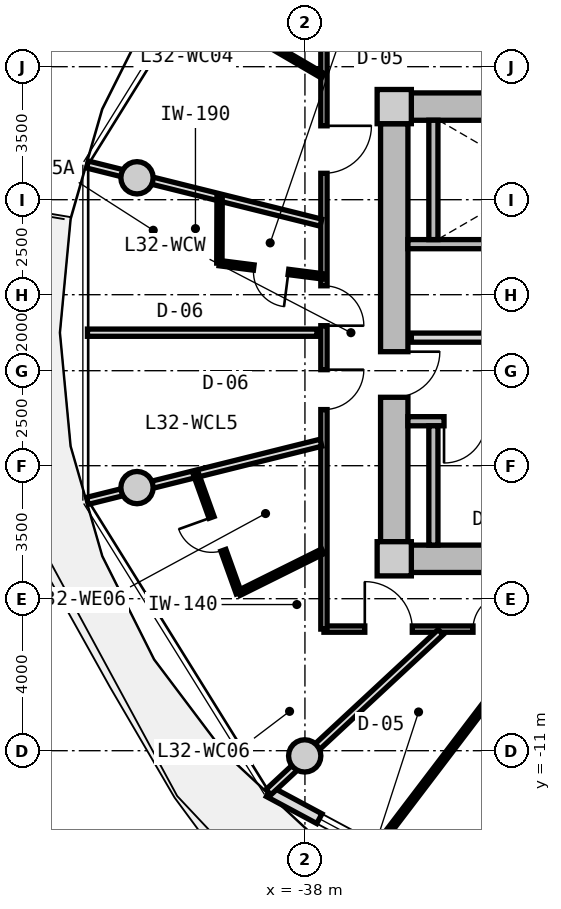
"""IFC4 building model, lengths in metres.
Left out: names, types, materials, properties, quantities, classifications, styles, units other than length and angle.
Written with IfcOpenShell. Run it as: python <this file> out.ifc"""

import sys

from ifc_helpers import new_model, si_unit, direction, frame, frame_2d, origin, origin_2d, place, context, subcontext, project, spatial, rectangle, circle, extrude, source, transform, mapped, element, fill, save


model = new_model("IFC4")
c1 = context("Model", 3, precision=1e-05, world=origin(), true_north=direction((0.0, 1.0)))
c2 = subcontext(c1, "Body", "Model", "MODEL_VIEW")
j1 = project(units=[si_unit("LENGTHUNIT", "METRE"), si_unit("PLANEANGLEUNIT", "RADIAN")], contexts=[c1])
p1 = place(None, origin())
s1 = spatial("IfcSite", under=j1, at=p1, CompositionType="ELEMENT")
p2 = place(p1, origin())
s2 = spatial("IfcBuilding", under=s1, at=p2, CompositionType="ELEMENT")
p3 = place(p2, frame((0.0, 0.0, 105.4)))
s3 = spatial("IfcBuildingStorey", under=s2, at=p3, CompositionType="ELEMENT", Elevation=105.4)
m1 = source(origin(), c2, "Body", "SweptSolid", [
    extrude(rectangle(XDim=0.9, YDim=0.9, at=origin_2d()), origin(), (0.0, 0.0, 1.0), 3.05),
])
for number, where, z_axis, x_axis in (
    (1, (-35.65, -5.95, 0.0), (0.0, 0.0, 1.0), (1.0, 0.0, 0.0)),
    (2, (-35.65, 5.95, 0.0), (0.0, 0.0, 1.0), (1.0, 0.0, 0.0)),
):
    element("IfcColumn", number, at=place(p3, frame(where, z_axis=z_axis, x_axis=x_axis)), inside=s3, PredefinedType="COLUMN", context=c2, shape_type="MappedRepresentation", body=[
        mapped(m1, transform((0.0, 0.0, 0.0), x_axis=(1.0, 0.0, 0.0), y_axis=(0.0, 1.0, 0.0), z_axis=(0.0, 0.0, 1.0), scale=1.0)),
    ])
m2 = source(origin(), c2, "Body", "SweptSolid", [
    extrude(rectangle(XDim=14.4, YDim=0.72, at=frame_2d((7.2, 0.0))), origin(), (0.0, 0.0, 1.0), 2.79),
])
for number, where, z_axis, x_axis in (
    (3, (-35.2, 5.95, 0.0), (0.0, 0.0, 1.0), (1.0, 0.0, 0.0)),
    (4, (-20.8, -5.95, 0.0), (0.0, 0.0, 1.0), (-1.0, 0.0, 0.0)),
):
    element("IfcWall", number, at=place(p3, frame(where, z_axis=z_axis, x_axis=x_axis)), inside=s3, PredefinedType="SHEAR", context=c2, shape_type="MappedRepresentation", body=[
        mapped(m2, transform((0.0, 0.0, 0.0), x_axis=(1.0, 0.0, 0.0), y_axis=(0.0, 1.0, 0.0), z_axis=(0.0, 0.0, 1.0), scale=1.0)),
    ])
m3 = source(origin(), c2, "Body", "SweptSolid", [
    extrude(rectangle(XDim=11.0, YDim=0.72, at=frame_2d((5.5, 0.0))), origin(), (0.0, 0.0, 1.0), 2.79),
])
p4 = place(p3, frame((-35.65, -5.5, 0.0), z_axis=(0.0, 0.0, 1.0), x_axis=(0.0, 1.0, 0.0)))
e5 = element("IfcWall", 5, at=p4, inside=s3, PredefinedType="SHEAR", context=c2, shape_type="MappedRepresentation", body=[
    mapped(m3, transform((0.0, 0.0, 0.0), x_axis=(1.0, 0.0, 0.0), y_axis=(0.0, 1.0, 0.0), z_axis=(0.0, 0.0, 1.0), scale=1.0)),
])
p5 = place(p4, frame((3.8, 0.0, 0.0)))
e6 = element("IfcOpeningElement", 6, at=p5, cuts=e5, PredefinedType="OPENING", context=c2, shape_type="SweptSolid", body=[
    extrude(rectangle(XDim=1.2, YDim=2.15, at=frame_2d((0.6, 1.075))), frame((0.0, 0.37, 0.0), z_axis=(0.0, -1.0, 0.0), x_axis=(1.0, 0.0, 0.0)), (0.0, 0.0, 1.0), 0.74),
])
m4 = source(origin(), c2, "Body", "SweptSolid", [
    extrude(circle(Radius=0.425, at=origin_2d()), origin(), (0.0, 0.0, 1.0), 3.05),
])
for number, where, z_axis, x_axis in (
    (7, (-42.419, 4.076, 0.0), (0.0, 0.0, 1.0), (1.0, 0.0, 0.0)),
    (8, (-42.419, -4.076, 0.0), (0.0, 0.0, 1.0), (1.0, 0.0, 0.0)),
    (9, (-38.006, -11.137, 0.0), (0.0, 0.0, 1.0), (1.0, 0.0, 0.0)),
):
    element("IfcColumn", number, at=place(p3, frame(where, z_axis=z_axis, x_axis=x_axis)), inside=s3, PredefinedType="COLUMN", context=c2, shape_type="MappedRepresentation", body=[
        mapped(m4, transform((0.0, 0.0, 0.0), x_axis=(1.0, 0.0, 0.0), y_axis=(0.0, 1.0, 0.0), z_axis=(0.0, 0.0, 1.0), scale=1.0)),
    ])
m5 = source(origin(), c2, "Body", "SweptSolid", [
    extrude(rectangle(XDim=9.351, YDim=0.29, at=frame_2d((4.675, 0.0))), origin(), (0.0, 0.0, 1.0), 2.79),
])
p6 = place(p3, frame((-30.707, -16.498, 0.0), z_axis=(0.0, 0.0, 1.0), x_axis=(-0.881184411073, 0.472772708267, 0.0)))
e10 = element("IfcWall", 10, at=p6, inside=s3, PredefinedType="SOLIDWALL", context=c2, shape_type="MappedRepresentation", body=[
    mapped(m5, transform((0.0, 0.0, 0.0), x_axis=(1.0, 0.0, 0.0), y_axis=(0.0, 1.0, 0.0), z_axis=(0.0, 0.0, 1.0), scale=1.0)),
])
p7 = place(p6, frame((0.9, 0.0, 0.0)))
e11 = element("IfcOpeningElement", 11, at=p7, cuts=e10, PredefinedType="OPENING", context=c2, shape_type="SweptSolid", body=[
    extrude(rectangle(XDim=1.15, YDim=2.25, at=frame_2d((0.575, 1.125))), frame((0.0, 0.155, 0.0), z_axis=(0.0, -1.0, 0.0), x_axis=(1.0, 0.0, 0.0)), (0.0, 0.0, 1.0), 0.31),
])
p8 = place(p6, frame((6.645, 0.0, 0.85)))
e12 = element("IfcOpeningElement", 12, at=p8, cuts=e10, PredefinedType="OPENING", context=c2, shape_type="SweptSolid", body=[
    extrude(rectangle(XDim=1.2, YDim=1.5, at=frame_2d((0.6, 0.75))), frame((0.0, 0.155, 0.0), z_axis=(0.0, -1.0, 0.0), x_axis=(1.0, 0.0, 0.0)), (0.0, 0.0, 1.0), 0.31),
])
m6 = source(origin(), c2, "Body", "SweptSolid", [
    extrude(rectangle(XDim=7.83, YDim=0.24, at=frame_2d((3.915, 0.0))), origin(), (0.0, 0.0, 1.0), 2.79),
])
p9 = place(p3, frame((-35.29, 2.33, 0.0), z_axis=(0.0, 0.0, 1.0), x_axis=(1.0, 0.0, 0.0)))
e13 = element("IfcWall", 13, at=p9, inside=s3, PredefinedType="PARTITIONING", context=c2, shape_type="MappedRepresentation", body=[
    mapped(m6, transform((0.0, 0.0, 0.0), x_axis=(1.0, 0.0, 0.0), y_axis=(0.0, 1.0, 0.0), z_axis=(0.0, 0.0, 1.0), scale=1.0)),
])
m7 = source(origin(), c2, "Body", "SweptSolid", [
    extrude(rectangle(XDim=3.14, YDim=0.24, at=frame_2d((1.57, 0.0))), origin(), (0.0, 0.0, 1.0), 2.79),
])
p10 = place(p3, frame((-34.62, 2.45, 0.0), z_axis=(0.0, 0.0, 1.0), x_axis=(0.0, 1.0, 0.0)))
e14 = element("IfcWall", 14, at=p10, inside=s3, PredefinedType="PARTITIONING", context=c2, shape_type="MappedRepresentation", body=[
    mapped(m7, transform((0.0, 0.0, 0.0), x_axis=(1.0, 0.0, 0.0), y_axis=(0.0, 1.0, 0.0), z_axis=(0.0, 0.0, 1.0), scale=1.0)),
])
p11 = place(p3, frame((-35.29, -2.33, 0.0), z_axis=(0.0, 0.0, 1.0), x_axis=(1.0, 0.0, 0.0)))
e15 = element("IfcWall", 15, at=p11, inside=s3, PredefinedType="PARTITIONING", context=c2, shape_type="MappedRepresentation", body=[
    mapped(m6, transform((0.0, 0.0, 0.0), x_axis=(1.0, 0.0, 0.0), y_axis=(0.0, 1.0, 0.0), z_axis=(0.0, 0.0, 1.0), scale=1.0)),
])
p12 = place(p11, frame((0.95, 0.0, 0.0)))
e16 = element("IfcOpeningElement", 16, at=p12, cuts=e15, PredefinedType="OPENING", context=c2, shape_type="SweptSolid", body=[
    extrude(rectangle(XDim=1.1, YDim=2.15, at=frame_2d((0.55, 1.075))), frame((0.0, 0.13, 0.0), z_axis=(0.0, -1.0, 0.0), x_axis=(1.0, 0.0, 0.0)), (0.0, 0.0, 1.0), 0.26),
])
p13 = place(p3, frame((-34.62, -5.59, 0.0), z_axis=(0.0, 0.0, 1.0), x_axis=(0.0, 1.0, 0.0)))
e17 = element("IfcWall", 17, at=p13, inside=s3, PredefinedType="PARTITIONING", context=c2, shape_type="MappedRepresentation", body=[
    mapped(m7, transform((0.0, 0.0, 0.0), x_axis=(1.0, 0.0, 0.0), y_axis=(0.0, 1.0, 0.0), z_axis=(0.0, 0.0, 1.0), scale=1.0)),
])
m8 = source(origin(), c2, "Body", "SweptSolid", [
    extrude(rectangle(XDim=7.62, YDim=0.24, at=frame_2d((3.81, 0.0))), origin(), (0.0, 0.0, 1.0), 2.775),
])
p14 = place(p3, frame((-35.2, -0.13, 0.0), z_axis=(0.0, 0.0, 1.0), x_axis=(1.0, 0.0, 0.0)))
e18 = element("IfcWall", 18, at=p14, inside=s3, PredefinedType="PARTITIONING", context=c2, shape_type="MappedRepresentation", body=[
    mapped(m8, transform((0.0, 0.0, 0.0), x_axis=(1.0, 0.0, 0.0), y_axis=(0.0, 1.0, 0.0), z_axis=(0.0, 0.0, 1.0), scale=1.0)),
])
p15 = place(p14, frame((6.22, 0.0, 0.0)))
e19 = element("IfcOpeningElement", 19, at=p15, cuts=e18, PredefinedType="OPENING", context=c2, shape_type="SweptSolid", body=[
    extrude(rectangle(XDim=1.0, YDim=2.1, at=frame_2d((0.5, 1.05))), frame((0.0, 0.13, 0.0), z_axis=(0.0, -1.0, 0.0), x_axis=(1.0, 0.0, 0.0)), (0.0, 0.0, 1.0), 0.26),
])
p16 = place(p14, frame((2.4, 0.0, 0.0)))
e20 = element("IfcOpeningElement", 20, at=p16, cuts=e18, PredefinedType="OPENING", context=c2, shape_type="SweptSolid", body=[
    extrude(rectangle(XDim=1.0, YDim=2.1, at=frame_2d((0.5, 1.05))), frame((0.0, 0.13, 0.0), z_axis=(0.0, -1.0, 0.0), x_axis=(1.0, 0.0, 0.0)), (0.0, 0.0, 1.0), 0.26),
])
m9 = source(origin(), c2, "Body", "SweptSolid", [
    extrude(rectangle(XDim=9.234, YDim=0.165, at=frame_2d((4.617, 0.0))), origin(), (0.0, 0.0, 1.0), 2.775),
])
p17 = place(p3, frame((-28.266, -7.8, 0.0), z_axis=(0.0, 0.0, 1.0), x_axis=(-1.0, 0.0, 0.0)))
e21 = element("IfcWall", 21, at=p17, inside=s3, PredefinedType="PARTITIONING", context=c2, shape_type="MappedRepresentation", body=[
    mapped(m9, transform((0.0, 0.0, 0.0), x_axis=(1.0, 0.0, 0.0), y_axis=(0.0, 1.0, 0.0), z_axis=(0.0, 0.0, 1.0), scale=1.0)),
])
p18 = place(p17, frame((6.909, 0.0, 0.0)))
e22 = element("IfcOpeningElement", 22, at=p18, cuts=e21, PredefinedType="OPENING", context=c2, shape_type="SweptSolid", body=[
    extrude(rectangle(XDim=1.25, YDim=2.2, at=frame_2d((0.625, 1.1))), frame((0.0, 0.093, 0.0), z_axis=(0.0, -1.0, 0.0), x_axis=(1.0, 0.0, 0.0)), (0.0, 0.0, 1.0), 0.185),
])
p19 = place(p17, frame((4.392, 0.0, 0.0)))
e23 = element("IfcOpeningElement", 23, at=p19, cuts=e21, PredefinedType="OPENING", context=c2, shape_type="SweptSolid", body=[
    extrude(rectangle(XDim=0.92, YDim=2.1, at=frame_2d((0.46, 1.05))), frame((0.0, 0.093, 0.0), z_axis=(0.0, -1.0, 0.0), x_axis=(1.0, 0.0, 0.0)), (0.0, 0.0, 1.0), 0.185),
])
p20 = place(p17, frame((1.408, 0.0, 0.0)))
e24 = element("IfcOpeningElement", 24, at=p20, cuts=e21, PredefinedType="OPENING", context=c2, shape_type="SweptSolid", body=[
    extrude(rectangle(XDim=0.92, YDim=2.1, at=frame_2d((0.46, 1.05))), frame((0.0, 0.093, 0.0), z_axis=(0.0, -1.0, 0.0), x_axis=(1.0, 0.0, 0.0)), (0.0, 0.0, 1.0), 0.185),
])
m10 = source(origin(), c2, "Body", "SweptSolid", [
    extrude(rectangle(XDim=15.6, YDim=0.165, at=frame_2d((7.8, 0.0))), origin(), (0.0, 0.0, 1.0), 2.775),
])
p21 = place(p3, frame((-37.5, -7.8, 0.0), z_axis=(0.0, 0.0, 1.0), x_axis=(0.0, 1.0, 0.0)))
e25 = element("IfcWall", 25, at=p21, inside=s3, PredefinedType="PARTITIONING", context=c2, shape_type="MappedRepresentation", body=[
    mapped(m10, transform((0.0, 0.0, 0.0), x_axis=(1.0, 0.0, 0.0), y_axis=(0.0, 1.0, 0.0), z_axis=(0.0, 0.0, 1.0), scale=1.0)),
])
p22 = place(p21, frame((11.994, 0.0, 0.0)))
e26 = element("IfcOpeningElement", 26, at=p22, cuts=e25, PredefinedType="OPENING", context=c2, shape_type="SweptSolid", body=[
    extrude(rectangle(XDim=1.25, YDim=2.2, at=frame_2d((0.625, 1.1))), frame((0.0, 0.093, 0.0), z_axis=(0.0, -1.0, 0.0), x_axis=(1.0, 0.0, 0.0)), (0.0, 0.0, 1.0), 0.185),
])
p23 = place(p21, frame((7.984, 0.0, 0.0)))
e27 = element("IfcOpeningElement", 27, at=p23, cuts=e25, PredefinedType="OPENING", context=c2, shape_type="SweptSolid", body=[
    extrude(rectangle(XDim=1.05, YDim=2.15, at=frame_2d((0.525, 1.075))), frame((0.0, 0.093, 0.0), z_axis=(0.0, -1.0, 0.0), x_axis=(1.0, 0.0, 0.0)), (0.0, 0.0, 1.0), 0.185),
])
p24 = place(p21, frame((5.777, 0.0, 0.0)))
e28 = element("IfcOpeningElement", 28, at=p24, cuts=e25, PredefinedType="OPENING", context=c2, shape_type="SweptSolid", body=[
    extrude(rectangle(XDim=1.05, YDim=2.15, at=frame_2d((0.525, 1.075))), frame((0.0, 0.093, 0.0), z_axis=(0.0, -1.0, 0.0), x_axis=(1.0, 0.0, 0.0)), (0.0, 0.0, 1.0), 0.185),
])
m11 = source(origin(), c2, "Body", "SweptSolid", [
    extrude(rectangle(XDim=6.331, YDim=0.19, at=frame_2d((3.165, 0.0))), origin(), (0.0, 0.0, 1.0), 2.275),
])
p25 = place(p3, frame((-37.58, 2.896, 0.0), z_axis=(0.0, 0.0, 1.0), x_axis=(-0.97036440661, 0.241646267062, 0.0)))
e29 = element("IfcWall", 29, at=p25, inside=s3, PredefinedType="PARTITIONING", context=c2, shape_type="MappedRepresentation", body=[
    mapped(m11, transform((0.0, 0.0, 0.0), x_axis=(1.0, 0.0, 0.0), y_axis=(0.0, 1.0, 0.0), z_axis=(0.0, 0.0, 1.0), scale=1.0)),
])
m12 = source(origin(), c2, "Body", "SweptSolid", [
    extrude(rectangle(XDim=2.172, YDim=0.14, at=frame_2d((1.086, 0.0))), origin(), (0.0, 0.0, 1.0), 2.775),
])
p26 = place(p3, frame((-37.53, 6.762, 0.0), z_axis=(0.0, 0.0, 1.0), x_axis=(-0.863562702562, 0.504241468688, 0.0)))
e30 = element("IfcWall", 30, at=p26, inside=s3, PredefinedType="PARTITIONING", context=c2, shape_type="MappedRepresentation", body=[
    mapped(m12, transform((0.0, 0.0, 0.0), x_axis=(1.0, 0.0, 0.0), y_axis=(0.0, 1.0, 0.0), z_axis=(0.0, 0.0, 1.0), scale=1.0)),
])
p27 = place(p3, frame((-37.58, -2.896, 0.0), z_axis=(0.0, 0.0, 1.0), x_axis=(-0.97036440661, -0.241646267062, 0.0)))
e31 = element("IfcWall", 31, at=p27, inside=s3, PredefinedType="PARTITIONING", context=c2, shape_type="MappedRepresentation", body=[
    mapped(m11, transform((0.0, 0.0, 0.0), x_axis=(1.0, 0.0, 0.0), y_axis=(0.0, 1.0, 0.0), z_axis=(0.0, 0.0, 1.0), scale=1.0)),
])
m13 = source(origin(), c2, "Body", "SweptSolid", [
    extrude(rectangle(XDim=6.039, YDim=0.19, at=frame_2d((3.019, 0.0))), origin(), (0.0, 0.0, 1.0), 2.775),
])
p28 = place(p3, frame((-37.685, 0.0, 0.0), z_axis=(0.0, 0.0, 1.0), x_axis=(-1.0, 0.0, 0.0)))
e32 = element("IfcWall", 32, at=p28, inside=s3, PredefinedType="PARTITIONING", context=c2, shape_type="MappedRepresentation", body=[
    mapped(m13, transform((0.0, 0.0, 0.0), x_axis=(1.0, 0.0, 0.0), y_axis=(0.0, 1.0, 0.0), z_axis=(0.0, 0.0, 1.0), scale=1.0)),
])
m14 = source(origin(), c2, "Body", "SweptSolid", [
    extrude(rectangle(XDim=2.744, YDim=0.14, at=frame_2d((1.372, 0.0))), origin(), (0.0, 0.0, 1.0), 2.775),
])
p29 = place(p3, frame((-37.53, 1.482, 0.0), z_axis=(0.0, 0.0, 1.0), x_axis=(-0.991916450239, 0.126892693823, 0.0)))
e33 = element("IfcWall", 33, at=p29, inside=s3, PredefinedType="PARTITIONING", context=c2, shape_type="MappedRepresentation", body=[
    mapped(m14, transform((0.0, 0.0, 0.0), x_axis=(1.0, 0.0, 0.0), y_axis=(0.0, 1.0, 0.0), z_axis=(0.0, 0.0, 1.0), scale=1.0)),
])
p30 = place(p29, frame((0.912, 0.0, 0.0)))
e34 = element("IfcOpeningElement", 34, at=p30, cuts=e33, PredefinedType="OPENING", context=c2, shape_type="SweptSolid", body=[
    extrude(rectangle(XDim=0.92, YDim=2.1, at=frame_2d((0.46, 1.05))), frame((0.0, 0.08, 0.0), z_axis=(0.0, -1.0, 0.0), x_axis=(1.0, 0.0, 0.0)), (0.0, 0.0, 1.0), 0.16),
])
m15 = source(origin(), c2, "Body", "SweptSolid", [
    extrude(rectangle(XDim=1.749, YDim=0.14, at=frame_2d((0.875, 0.0))), origin(), (0.0, 0.0, 1.0), 2.775),
])
p31 = place(p3, frame((-40.251, 1.831, 0.0), z_axis=(0.0, 0.0, 1.0), x_axis=(0.003350064953, 0.999994388517, 0.0)))
e35 = element("IfcWall", 35, at=p31, inside=s3, PredefinedType="PARTITIONING", context=c2, shape_type="MappedRepresentation", body=[
    mapped(m15, transform((0.0, 0.0, 0.0), x_axis=(1.0, 0.0, 0.0), y_axis=(0.0, 1.0, 0.0), z_axis=(0.0, 0.0, 1.0), scale=1.0)),
])
m16 = source(origin(), c2, "Body", "SweptSolid", [
    extrude(rectangle(XDim=6.187, YDim=0.19, at=frame_2d((3.093, 0.0))), origin(), (0.0, 0.0, 1.0), 2.415),
])
p32 = place(p3, frame((-34.429, -7.88, 0.0), z_axis=(0.0, 0.0, 1.0), x_axis=(-0.732501077882, -0.680765870841, 0.0)))
e36 = element("IfcWall", 36, at=p32, inside=s3, PredefinedType="PARTITIONING", context=c2, shape_type="MappedRepresentation", body=[
    mapped(m16, transform((0.0, 0.0, 0.0), x_axis=(1.0, 0.0, 0.0), y_axis=(0.0, 1.0, 0.0), z_axis=(0.0, 0.0, 1.0), scale=1.0)),
])
m17 = source(origin(), c2, "Body", "SweptSolid", [
    extrude(rectangle(XDim=2.469, YDim=0.14, at=frame_2d((1.235, 0.0))), origin(), (0.0, 0.0, 1.0), 2.775),
])
p33 = place(p3, frame((-37.53, -5.754, 0.0), z_axis=(0.0, 0.0, 1.0), x_axis=(-0.895512172456, -0.445037019789, 0.0)))
e37 = element("IfcWall", 37, at=p33, inside=s3, PredefinedType="PARTITIONING", context=c2, shape_type="MappedRepresentation", body=[
    mapped(m17, transform((0.0, 0.0, 0.0), x_axis=(1.0, 0.0, 0.0), y_axis=(0.0, 1.0, 0.0), z_axis=(0.0, 0.0, 1.0), scale=1.0)),
])
m18 = source(origin(), c2, "Body", "SweptSolid", [
    extrude(rectangle(XDim=3.314, YDim=0.14, at=frame_2d((1.657, 0.0))), origin(), (0.0, 0.0, 1.0), 2.775),
])
p34 = place(p3, frame((-39.741, -6.853, 0.0), z_axis=(0.0, 0.0, 1.0), x_axis=(-0.338067217654, 0.941121966776, 0.0)))
e38 = element("IfcWall", 38, at=p34, inside=s3, PredefinedType="PARTITIONING", context=c2, shape_type="MappedRepresentation", body=[
    mapped(m18, transform((0.0, 0.0, 0.0), x_axis=(1.0, 0.0, 0.0), y_axis=(0.0, 1.0, 0.0), z_axis=(0.0, 0.0, 1.0), scale=1.0)),
])
p35 = place(p34, frame((1.197, 0.0, 0.0)))
e39 = element("IfcOpeningElement", 39, at=p35, cuts=e38, PredefinedType="OPENING", context=c2, shape_type="SweptSolid", body=[
    extrude(rectangle(XDim=0.92, YDim=2.1, at=frame_2d((0.46, 1.05))), frame((0.0, 0.08, 0.0), z_axis=(0.0, -1.0, 0.0), x_axis=(1.0, 0.0, 0.0)), (0.0, 0.0, 1.0), 0.16),
])
m19 = source(origin(), c2, "Body", "SweptSolid", [
    extrude(rectangle(XDim=7.243, YDim=0.14, at=frame_2d((3.621, 0.0))), origin(), (0.0, 0.0, 1.0), 2.775),
])
p36 = place(p3, frame((-31.774, -7.83, 0.0), z_axis=(0.0, 0.0, 1.0), x_axis=(-0.605111472002, -0.796140757939, 0.0)))
e40 = element("IfcWall", 40, at=p36, inside=s3, PredefinedType="PARTITIONING", context=c2, shape_type="MappedRepresentation", body=[
    mapped(m19, transform((0.0, 0.0, 0.0), x_axis=(1.0, 0.0, 0.0), y_axis=(0.0, 1.0, 0.0), z_axis=(0.0, 0.0, 1.0), scale=1.0)),
])
m20 = source(origin(), c2, "Body", "SweptSolid", [
    extrude(rectangle(XDim=1.2, YDim=1.5, at=frame_2d((0.6, 0.75))), frame((0.0, 0.03, 0.0), z_axis=(0.0, -1.0, 0.0), x_axis=(1.0, 0.0, 0.0)), (0.0, 0.0, 1.0), 0.06),
])
p37 = place(p8, origin())
e41 = element("IfcWindow", 41, at=p37, inside=s3, PartitioningType="SINGLE_PANEL", PredefinedType="WINDOW", context=c2, shape_type="MappedRepresentation", body=[
    mapped(m20, transform((0.0, 0.0, 0.0), x_axis=(1.0, 0.0, 0.0), y_axis=(0.0, 1.0, 0.0), z_axis=(0.0, 0.0, 1.0), scale=1.0)),
])
fill(e12, e41)
m21 = source(origin(), c2, "Body", "SweptSolid", [
    extrude(rectangle(XDim=1.1, YDim=2.15, at=frame_2d((0.55, 1.075))), frame((0.0, 0.025, 0.0), z_axis=(0.0, -1.0, 0.0), x_axis=(1.0, 0.0, 0.0)), (0.0, 0.0, 1.0), 0.05),
])
p38 = place(p12, frame((1.1, 0.0, 0.0), z_axis=(0.0, 0.0, 1.0), x_axis=(-1.0, 0.0, 0.0)))
e42 = element("IfcDoor", 42, at=p38, inside=s3, OperationType="SINGLE_SWING_RIGHT", PredefinedType="DOOR", context=c2, shape_type="MappedRepresentation", body=[
    mapped(m21, transform((0.0, 0.0, 0.0), x_axis=(1.0, 0.0, 0.0), y_axis=(0.0, 1.0, 0.0), z_axis=(0.0, 0.0, 1.0), scale=1.0)),
])
fill(e16, e42)
m22 = source(origin(), c2, "Body", "SweptSolid", [
    extrude(rectangle(XDim=1.2, YDim=2.15, at=frame_2d((0.6, 1.075))), frame((0.0, 0.025, 0.0), z_axis=(0.0, -1.0, 0.0), x_axis=(1.0, 0.0, 0.0)), (0.0, 0.0, 1.0), 0.05),
])
p39 = place(p5, frame((1.2, 0.0, 0.0), z_axis=(0.0, 0.0, 1.0), x_axis=(-1.0, 0.0, 0.0)))
e43 = element("IfcDoor", 43, at=p39, inside=s3, OperationType="SINGLE_SWING_LEFT", PredefinedType="DOOR", context=c2, shape_type="MappedRepresentation", body=[
    mapped(m22, transform((0.0, 0.0, 0.0), x_axis=(1.0, 0.0, 0.0), y_axis=(0.0, 1.0, 0.0), z_axis=(0.0, 0.0, 1.0), scale=1.0)),
])
fill(e6, e43)
m23 = source(origin(), c2, "Body", "SweptSolid", [
    extrude(rectangle(XDim=1.25, YDim=2.2, at=frame_2d((0.625, 1.1))), frame((0.0, 0.025, 0.0), z_axis=(0.0, -1.0, 0.0), x_axis=(1.0, 0.0, 0.0)), (0.0, 0.0, 1.0), 0.05),
])
p40 = place(p22, frame((1.25, 0.0, 0.0), z_axis=(0.0, 0.0, 1.0), x_axis=(-1.0, 0.0, 0.0)))
e44 = element("IfcDoor", 44, at=p40, inside=s3, OperationType="SINGLE_SWING_LEFT", PredefinedType="DOOR", context=c2, shape_type="MappedRepresentation", body=[
    mapped(m23, transform((0.0, 0.0, 0.0), x_axis=(1.0, 0.0, 0.0), y_axis=(0.0, 1.0, 0.0), z_axis=(0.0, 0.0, 1.0), scale=1.0)),
])
fill(e26, e44)
m24 = source(origin(), c2, "Body", "SweptSolid", [
    extrude(rectangle(XDim=1.05, YDim=2.15, at=frame_2d((0.525, 1.075))), frame((0.0, 0.025, 0.0), z_axis=(0.0, -1.0, 0.0), x_axis=(1.0, 0.0, 0.0)), (0.0, 0.0, 1.0), 0.05),
])
p41 = place(p23, frame((1.05, 0.0, 0.0), z_axis=(0.0, 0.0, 1.0), x_axis=(-1.0, 0.0, 0.0)))
e45 = element("IfcDoor", 45, at=p41, inside=s3, OperationType="SINGLE_SWING_RIGHT", PredefinedType="DOOR", context=c2, shape_type="MappedRepresentation", body=[
    mapped(m24, transform((0.0, 0.0, 0.0), x_axis=(1.0, 0.0, 0.0), y_axis=(0.0, 1.0, 0.0), z_axis=(0.0, 0.0, 1.0), scale=1.0)),
])
fill(e27, e45)
m25 = source(origin(), c2, "Body", "SweptSolid", [
    extrude(rectangle(XDim=0.92, YDim=2.1, at=frame_2d((0.46, 1.05))), frame((0.0, 0.025, 0.0), z_axis=(0.0, -1.0, 0.0), x_axis=(1.0, 0.0, 0.0)), (0.0, 0.0, 1.0), 0.05),
])
p42 = place(p30, origin())
e46 = element("IfcDoor", 46, at=p42, inside=s3, OperationType="SINGLE_SWING_LEFT", PredefinedType="DOOR", context=c2, shape_type="MappedRepresentation", body=[
    mapped(m25, transform((0.0, 0.0, 0.0), x_axis=(1.0, 0.0, 0.0), y_axis=(0.0, 1.0, 0.0), z_axis=(0.0, 0.0, 1.0), scale=1.0)),
])
fill(e34, e46)
p43 = place(p24, frame((1.05, 0.0, 0.0), z_axis=(0.0, 0.0, 1.0), x_axis=(-1.0, 0.0, 0.0)))
e47 = element("IfcDoor", 47, at=p43, inside=s3, OperationType="SINGLE_SWING_LEFT", PredefinedType="DOOR", context=c2, shape_type="MappedRepresentation", body=[
    mapped(m24, transform((0.0, 0.0, 0.0), x_axis=(1.0, 0.0, 0.0), y_axis=(0.0, 1.0, 0.0), z_axis=(0.0, 0.0, 1.0), scale=1.0)),
])
fill(e28, e47)
p44 = place(p18, frame((1.25, 0.0, 0.0), z_axis=(0.0, 0.0, 1.0), x_axis=(-1.0, 0.0, 0.0)))
e48 = element("IfcDoor", 48, at=p44, inside=s3, OperationType="SINGLE_SWING_LEFT", PredefinedType="DOOR", context=c2, shape_type="MappedRepresentation", body=[
    mapped(m23, transform((0.0, 0.0, 0.0), x_axis=(1.0, 0.0, 0.0), y_axis=(0.0, 1.0, 0.0), z_axis=(0.0, 0.0, 1.0), scale=1.0)),
])
fill(e22, e48)
p45 = place(p35, origin())
e49 = element("IfcDoor", 49, at=p45, inside=s3, OperationType="SINGLE_SWING_RIGHT", PredefinedType="DOOR", context=c2, shape_type="MappedRepresentation", body=[
    mapped(m25, transform((0.0, 0.0, 0.0), x_axis=(1.0, 0.0, 0.0), y_axis=(0.0, 1.0, 0.0), z_axis=(0.0, 0.0, 1.0), scale=1.0)),
])
fill(e39, e49)
p46 = place(p19, frame((0.92, 0.0, 0.0), z_axis=(0.0, 0.0, 1.0), x_axis=(-1.0, 0.0, 0.0)))
e50 = element("IfcDoor", 50, at=p46, inside=s3, OperationType="SINGLE_SWING_RIGHT", PredefinedType="DOOR", context=c2, shape_type="MappedRepresentation", body=[
    mapped(m25, transform((0.0, 0.0, 0.0), x_axis=(1.0, 0.0, 0.0), y_axis=(0.0, 1.0, 0.0), z_axis=(0.0, 0.0, 1.0), scale=1.0)),
])
fill(e23, e50)
save(model, sys.argv[1])
